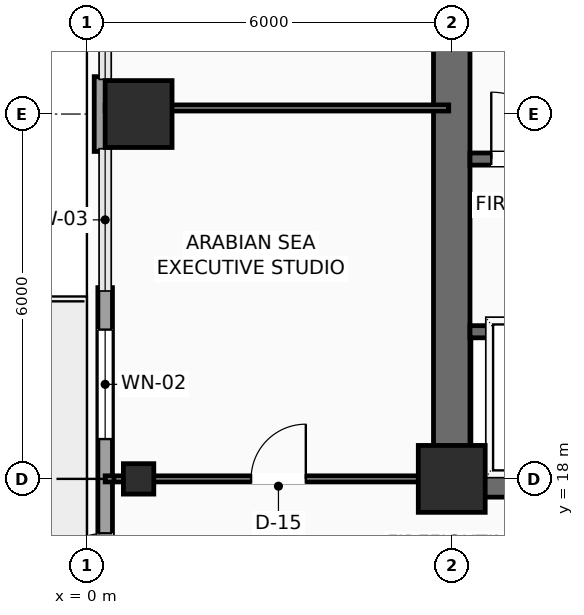
"""IFC4 building model, lengths in metres.
Left out: names, types, materials, properties, quantities, classifications, styles, units other than length and angle.
Written with IfcOpenShell. Run it as: python <this file> out.ifc"""

import sys

from ifc_helpers import new_model, si_unit, direction, frame, frame_2d, origin, origin_2d, place, context, subcontext, project, spatial, rectangle, hollow_rectangle, extrude, element, fill, save


model = new_model("IFC4")
c1 = context("Model", 3, precision=1e-05, world=origin(), true_north=direction((0.0, 1.0)))
c2 = subcontext(c1, "Body", "Model", "MODEL_VIEW")
j1 = project(units=[si_unit("LENGTHUNIT", "METRE"), si_unit("PLANEANGLEUNIT", "RADIAN")], contexts=[c1])
p1 = place(None, origin())
s1 = spatial("IfcSite", under=j1, at=p1, CompositionType="ELEMENT")
p2 = place(p1, origin())
s2 = spatial("IfcBuilding", under=s1, at=p2, CompositionType="ELEMENT")
p3 = place(p2, frame((0.0, 0.0, 141.9)))
s3 = spatial("IfcBuildingStorey", under=s2, at=p3, CompositionType="ELEMENT", Elevation=141.9)
p4 = place(p3, frame((6.0, 18.0, 0.0), z_axis=(0.0, 0.0, 1.0), x_axis=(1.0, 0.0, 0.0)))
e1 = element("IfcColumn", 1, at=p4, inside=s3, PredefinedType="COLUMN", context=c2, shape_type="SweptSolid", body=[
    extrude(rectangle(XDim=1.1, YDim=1.1, at=origin_2d()), origin(), (0.0, 0.0, 1.0), 3.75),
])
p5 = place(p3, frame((0.85, 18.0, 0.0), z_axis=(0.0, 0.0, 1.0), x_axis=(1.0, 0.0, 0.0)))
e2 = element("IfcColumn", 2, at=p5, inside=s3, PredefinedType="COLUMN", context=c2, shape_type="SweptSolid", body=[
    extrude(hollow_rectangle(XDim=0.5, YDim=0.5, WallThickness=0.025, InnerFilletRadius=0.025, OuterFilletRadius=0.04, at=origin_2d()), origin(), (0.0, 0.0, 1.0), 3.75),
])
p6 = place(p3, frame((0.85, 24.0, 0.0), z_axis=(0.0, 0.0, 1.0), x_axis=(1.0, 0.0, 0.0)))
e3 = element("IfcColumn", 3, at=p6, inside=s3, PredefinedType="COLUMN", context=c2, shape_type="SweptSolid", body=[
    extrude(rectangle(XDim=1.1, YDim=1.1, at=origin_2d()), origin(), (0.0, 0.0, 1.0), 3.75),
])
p7 = place(p3, frame((0.3, 11.855, 0.0), z_axis=(0.0, 0.0, 1.0), x_axis=(0.0, 1.0, 0.0)))
e4 = element("IfcWall", 4, at=p7, inside=s3, PredefinedType="SOLIDWALL", context=c2, shape_type="SweptSolid", body=[
    extrude(rectangle(XDim=9.29, YDim=0.24, at=frame_2d((4.645, 0.0))), origin(), (0.0, 0.0, 1.0), 3.525),
])
p8 = place(p7, frame((4.2, 0.0, 0.0)))
e5 = element("IfcOpeningElement", 5, at=p8, cuts=e4, PredefinedType="OPENING", context=c2, shape_type="SweptSolid", body=[
    extrude(rectangle(XDim=1.05, YDim=2.2, at=frame_2d((0.525, 1.1))), frame((0.0, 0.13, 0.0), z_axis=(0.0, -1.0, 0.0), x_axis=(1.0, 0.0, 0.0)), (0.0, 0.0, 1.0), 0.26),
])
p9 = place(p7, frame((6.8, 0.0, 0.85)))
e6 = element("IfcOpeningElement", 6, at=p9, cuts=e4, PredefinedType="OPENING", context=c2, shape_type="SweptSolid", body=[
    extrude(rectangle(XDim=1.8, YDim=2.1, at=frame_2d((0.9, 1.05))), frame((0.0, 0.13, 0.0), z_axis=(0.0, -1.0, 0.0), x_axis=(1.0, 0.0, 0.0)), (0.0, 0.0, 1.0), 0.26),
])
p10 = place(p3, frame((0.24, 23.385, 0.0), z_axis=(0.0, 0.0, 1.0), x_axis=(0.0, 1.0, 0.0)))
e7 = element("IfcWall", 7, at=p10, inside=s3, PredefinedType="SOLIDWALL", context=c2, shape_type="SweptSolid", body=[
    extrude(rectangle(XDim=1.23, YDim=0.24, at=frame_2d((0.615, 0.0))), origin(), (0.0, 0.0, 1.0), 3.525),
])
p11 = place(p3, frame((6.0, 18.0, 0.0), z_axis=(0.0, 0.0, 1.0), x_axis=(1.0, 0.0, 0.0)))
e8 = element("IfcWall", 8, at=p11, inside=s3, PredefinedType="SHEAR", context=c2, shape_type="SweptSolid", body=[
    extrude(rectangle(XDim=12.0, YDim=0.6, at=frame_2d((6.0, 0.0))), origin(), (0.0, 0.0, 1.0), 3.525),
])
p12 = place(p11, frame((7.15, 0.0, 0.0)))
e9 = element("IfcOpeningElement", 9, at=p12, cuts=e8, PredefinedType="OPENING", context=c2, shape_type="SweptSolid", body=[
    extrude(rectangle(XDim=1.6, YDim=2.3, at=frame_2d((0.8, 1.15))), frame((0.0, 0.31, 0.0), z_axis=(0.0, -1.0, 0.0), x_axis=(1.0, 0.0, 0.0)), (0.0, 0.0, 1.0), 0.62),
])
p13 = place(p3, frame((6.0, 18.0, 0.0), z_axis=(0.0, 0.0, 1.0), x_axis=(0.0, 1.0, 0.0)))
e10 = element("IfcWall", 10, at=p13, inside=s3, PredefinedType="SHEAR", context=c2, shape_type="SweptSolid", body=[
    extrude(rectangle(XDim=9.6, YDim=0.6, at=frame_2d((4.8, 0.0))), origin(), (0.0, 0.0, 1.0), 3.525),
])
p14 = place(p3, frame((6.3, 23.26, 0.0), z_axis=(0.0, 0.0, 1.0), x_axis=(1.0, 0.0, 0.0)))
e11 = element("IfcWall", 11, at=p14, inside=s3, PredefinedType="SHEAR", context=c2, shape_type="SweptSolid", body=[
    extrude(rectangle(XDim=8.88, YDim=0.2, at=frame_2d((4.44, 0.0))), origin(), (0.0, 0.0, 1.0), 3.525),
])
p15 = place(p14, frame((0.35, 0.0, 0.0)))
e12 = element("IfcOpeningElement", 12, at=p15, cuts=e11, PredefinedType="OPENING", context=c2, shape_type="SweptSolid", body=[
    extrude(rectangle(XDim=1.1, YDim=2.2, at=frame_2d((0.55, 1.1))), frame((0.0, 0.11, 0.0), z_axis=(0.0, -1.0, 0.0), x_axis=(1.0, 0.0, 0.0)), (0.0, 0.0, 1.0), 0.22),
])
p16 = place(p3, frame((6.3, 20.42, 0.0), z_axis=(0.0, 0.0, 1.0), x_axis=(1.0, 0.0, 0.0)))
e13 = element("IfcWall", 13, at=p16, inside=s3, PredefinedType="SHEAR", context=c2, shape_type="SweptSolid", body=[
    extrude(rectangle(XDim=4.95, YDim=0.2, at=frame_2d((2.475, 0.0))), origin(), (0.0, 0.0, 1.0), 3.525),
])
p17 = place(p16, frame((0.65, 0.0, 0.0)))
e14 = element("IfcOpeningElement", 14, at=p17, cuts=e13, PredefinedType="OPENING", context=c2, shape_type="SweptSolid", body=[
    extrude(rectangle(XDim=1.1, YDim=2.2, at=frame_2d((0.55, 1.1))), frame((0.0, 0.11, 0.0), z_axis=(0.0, -1.0, 0.0), x_axis=(1.0, 0.0, 0.0)), (0.0, 0.0, 1.0), 0.22),
])
p18 = place(p16, frame((3.05, 0.0, 0.0)))
e15 = element("IfcOpeningElement", 15, at=p18, cuts=e13, PredefinedType="OPENING", context=c2, shape_type="SweptSolid", body=[
    extrude(rectangle(XDim=1.1, YDim=2.2, at=frame_2d((0.55, 1.1))), frame((0.0, 0.11, 0.0), z_axis=(0.0, -1.0, 0.0), x_axis=(1.0, 0.0, 0.0)), (0.0, 0.0, 1.0), 0.22),
])
p19 = place(p3, frame((0.3, 18.0, 0.0), z_axis=(0.0, 0.0, 1.0), x_axis=(1.0, 0.0, 0.0)))
e16 = element("IfcWall", 16, at=p19, inside=s3, PredefinedType="PARTITIONING", context=c2, shape_type="SweptSolid", body=[
    extrude(rectangle(XDim=5.65, YDim=0.1, at=frame_2d((2.825, 0.0))), origin(), (0.0, 0.0, 1.0), 3.017),
])
p20 = place(p19, frame((2.4, 0.0, 0.0)))
e17 = element("IfcOpeningElement", 17, at=p20, cuts=e16, PredefinedType="OPENING", context=c2, shape_type="SweptSolid", body=[
    extrude(rectangle(XDim=0.9, YDim=2.1, at=frame_2d((0.45, 1.05))), frame((0.0, 0.06, 0.0), z_axis=(0.0, -1.0, 0.0), x_axis=(1.0, 0.0, 0.0)), (0.0, 0.0, 1.0), 0.12),
])
p21 = place(p3, frame((0.3, 24.1, 0.0), z_axis=(0.0, 0.0, 1.0), x_axis=(1.0, 0.0, 0.0)))
e18 = element("IfcWall", 18, at=p21, inside=s3, PredefinedType="PARTITIONING", context=c2, shape_type="SweptSolid", body=[
    extrude(rectangle(XDim=5.65, YDim=0.1, at=frame_2d((2.825, 0.0))), origin(), (0.0, 0.0, 1.0), 3.525),
])
p22 = place(p8, origin())
e19 = element("IfcDoor", 19, at=p22, inside=s3, OperationType="SINGLE_SWING_LEFT", PredefinedType="DOOR", context=c2, shape_type="SweptSolid", body=[
    extrude(rectangle(XDim=1.05, YDim=2.2, at=frame_2d((0.525, 1.1))), frame((0.0, 0.025, 0.0), z_axis=(0.0, -1.0, 0.0), x_axis=(1.0, 0.0, 0.0)), (0.0, 0.0, 1.0), 0.05),
])
fill(e5, e19)
p23 = place(p9, origin())
e20 = element("IfcWindow", 20, at=p23, inside=s3, PartitioningType="SINGLE_PANEL", PredefinedType="WINDOW", context=c2, shape_type="SweptSolid", body=[
    extrude(rectangle(XDim=1.8, YDim=2.1, at=frame_2d((0.9, 1.05))), frame((0.0, 0.03, 0.0), z_axis=(0.0, -1.0, 0.0), x_axis=(1.0, 0.0, 0.0)), (0.0, 0.0, 1.0), 0.06),
])
fill(e6, e20)
p24 = place(p15, origin())
e21 = element("IfcDoor", 21, at=p24, inside=s3, OperationType="SINGLE_SWING_LEFT", PredefinedType="DOOR", context=c2, shape_type="SweptSolid", body=[
    extrude(rectangle(XDim=1.1, YDim=2.2, at=frame_2d((0.55, 1.1))), frame((0.0, 0.025, 0.0), z_axis=(0.0, -1.0, 0.0), x_axis=(1.0, 0.0, 0.0)), (0.0, 0.0, 1.0), 0.05),
])
fill(e12, e21)
p25 = place(p20, origin())
e22 = element("IfcDoor", 22, at=p25, inside=s3, OperationType="SINGLE_SWING_RIGHT", PredefinedType="DOOR", context=c2, shape_type="SweptSolid", body=[
    extrude(rectangle(XDim=0.9, YDim=2.1, at=frame_2d((0.45, 1.05))), frame((0.0, 0.025, 0.0), z_axis=(0.0, -1.0, 0.0), x_axis=(1.0, 0.0, 0.0)), (0.0, 0.0, 1.0), 0.05),
])
fill(e17, e22)
save(model, sys.argv[1])
